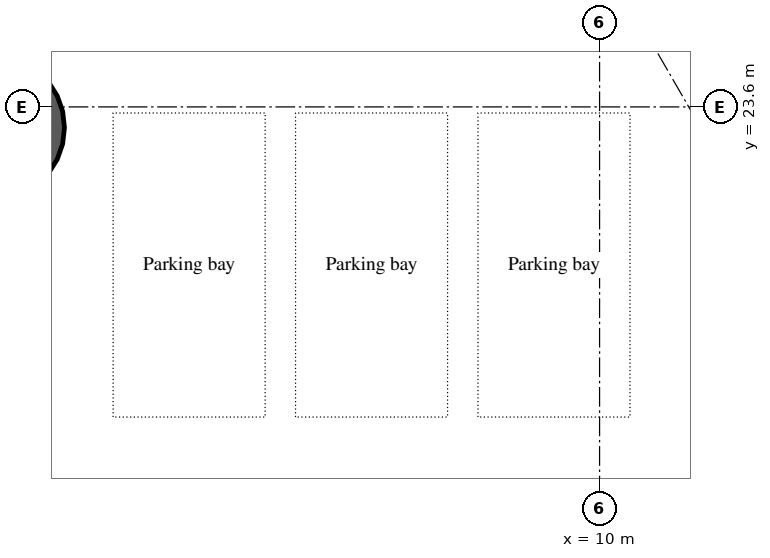
"""IFC4 building model, lengths in metres.
Left out: names, types, materials, properties, quantities, classifications, styles, units other than length and angle.
Written with IfcOpenShell. Run it as: python <this file> out.ifc"""

import sys

from ifc_helpers import new_model, si_unit, direction, frame, origin, origin_2d, place, context, subcontext, project, spatial, hollow_circle, extrude, element, save


model = new_model("IFC4")
c1 = context("Model", 3, precision=1e-05, world=origin(), true_north=direction((0.0, 1.0)))
c2 = subcontext(c1, "Body", "Model", "MODEL_VIEW")
j1 = project(units=[si_unit("LENGTHUNIT", "METRE"), si_unit("PLANEANGLEUNIT", "RADIAN")], contexts=[c1])
p1 = place(None, origin())
s1 = spatial("IfcSite", under=j1, at=p1, CompositionType="ELEMENT")
p2 = place(p1, origin())
s2 = spatial("IfcBuilding", under=s1, at=p2, CompositionType="ELEMENT")
p3 = place(p2, frame((0.0, 0.0, -4.2)))
s3 = spatial("IfcBuildingStorey", under=s2, at=p3, CompositionType="ELEMENT", Elevation=-4.2)
p4 = place(p3, frame((0.0, 23.26, -0.38), z_axis=(0.0, 0.0, 1.0), x_axis=(1.0, 0.0, 0.0)))
e1 = element("IfcColumn", 1, at=p4, inside=s3, PredefinedType="COLUMN", context=c2, shape_type="SweptSolid", body=[
    extrude(hollow_circle(Radius=1.2, WallThickness=0.06, at=origin_2d()), origin(), (0.0, 0.0, 1.0), 4.16),
])
save(model, sys.argv[1])
